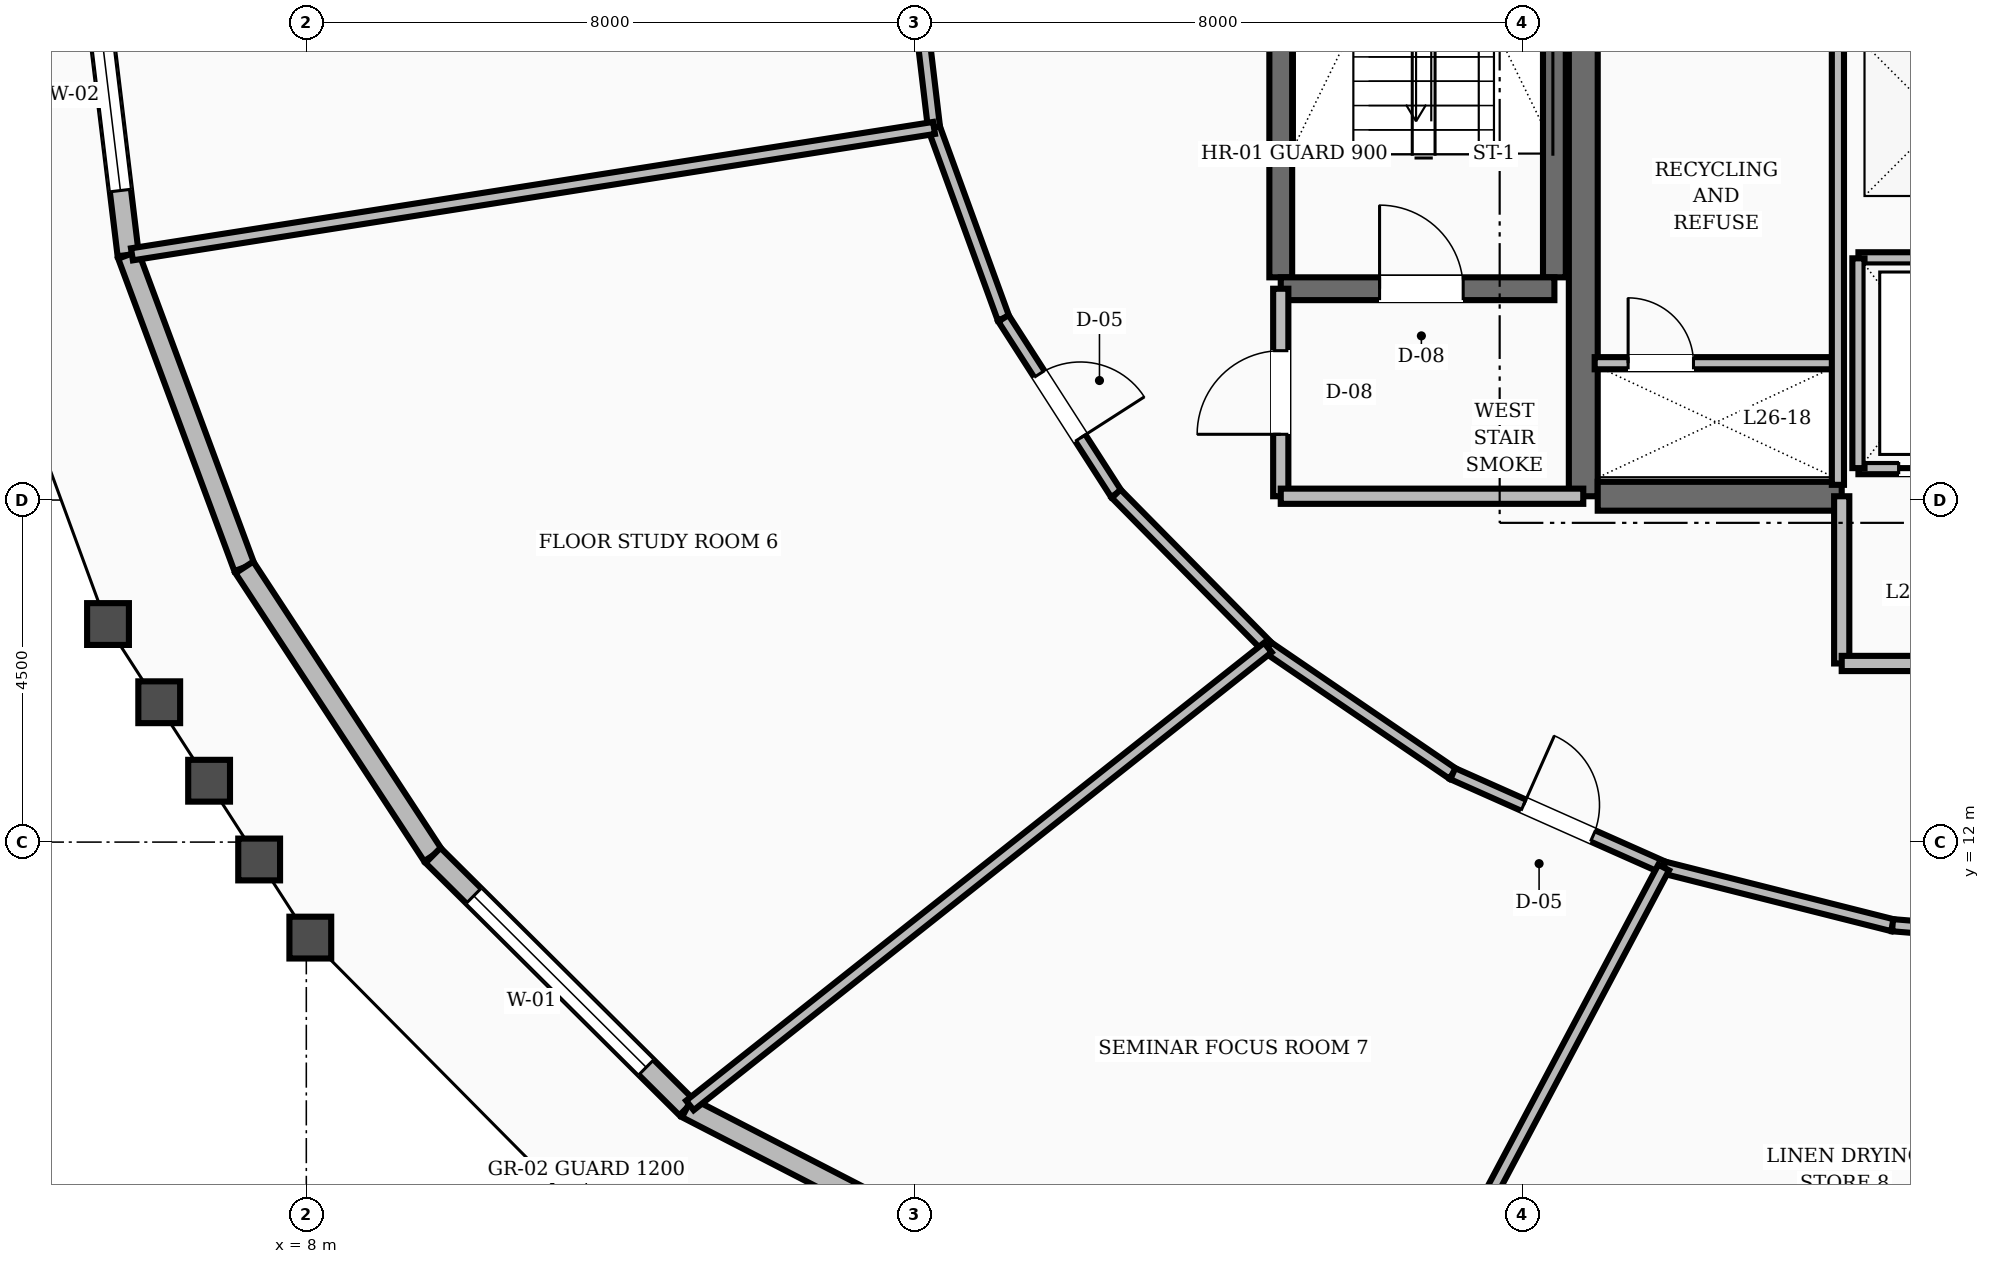
"""IFC4 building model, lengths in metres.
Left out: names, types, materials, properties, quantities, classifications, styles, units other than length and angle.
Written with IfcOpenShell. Run it as: python <this file> out.ifc"""

import sys

from ifc_helpers import new_model, si_unit, direction, frame, frame_2d, origin, place, context, subcontext, project, spatial, rectangle, extrude, element, fill, save


model = new_model("IFC4")
c1 = context("Model", 3, precision=1e-05, world=origin(), true_north=direction((0.0, 1.0)))
c2 = subcontext(c1, "Body", "Model", "MODEL_VIEW")
j1 = project(units=[si_unit("LENGTHUNIT", "METRE"), si_unit("PLANEANGLEUNIT", "RADIAN")], contexts=[c1])
p1 = place(None, origin())
s1 = spatial("IfcSite", under=j1, at=p1, CompositionType="ELEMENT")
p2 = place(p1, origin())
s2 = spatial("IfcBuilding", under=s1, at=p2, CompositionType="ELEMENT")
p3 = place(p2, frame((0.0, 0.0, 102.4)))
s3 = spatial("IfcBuildingStorey", under=s2, at=p3, CompositionType="ELEMENT", Elevation=102.4)
p4 = place(p3, frame((24.8, 16.55, 0.0), z_axis=(0.0, 0.0, 1.0), x_axis=(0.0, 1.0, 0.0)))
e1 = element("IfcWall", 1, at=p4, inside=s3, PredefinedType="SHEAR", context=c2, shape_type="SweptSolid", body=[
    extrude(rectangle(XDim=6.3, YDim=0.38, at=frame_2d((3.15, 0.0))), origin(), (0.0, 0.0, 1.0), 3.6),
])
p5 = place(p3, frame((24.99, 16.55, 0.0), z_axis=(0.0, 0.0, 1.0), x_axis=(1.0, 0.0, 0.0)))
e2 = element("IfcWall", 2, at=p5, inside=s3, PredefinedType="SHEAR", context=c2, shape_type="SweptSolid", body=[
    extrude(rectangle(XDim=3.21, YDim=0.38, at=frame_2d((1.605, 0.0))), origin(), (0.0, 0.0, 1.0), 3.6),
])
for number, where, z_axis, x_axis in (
    (3, (20.82, 19.43, 0.0), (0.0, 0.0, 1.0), (0.0, 1.0, 0.0)),
    (4, (24.42, 19.43, 0.0), (0.0, 0.0, 1.0), (0.0, 1.0, 0.0)),
):
    element("IfcWall", number, at=place(p3, frame(where, z_axis=z_axis, x_axis=x_axis)), inside=s3, PredefinedType="SHEAR", context=c2, shape_type="SweptSolid", body=[
        extrude(rectangle(XDim=8.74, YDim=0.3, at=frame_2d((4.37, 0.0))), origin(), (0.0, 0.0, 1.0), 3.6),
    ])
p6 = place(p3, frame((20.82, 19.28, 0.0), z_axis=(0.0, 0.0, 1.0), x_axis=(1.0, 0.0, 0.0)))
e5 = element("IfcWall", 5, at=p6, inside=s3, PredefinedType="SHEAR", context=c2, shape_type="SweptSolid", body=[
    extrude(rectangle(XDim=3.6, YDim=0.3, at=frame_2d((1.8, 0.0))), origin(), (0.0, 0.0, 1.0), 3.6),
])
p7 = place(p6, frame((1.3, 0.0, 0.0)))
e6 = element("IfcOpeningElement", 6, at=p7, cuts=e5, PredefinedType="OPENING", context=c2, shape_type="SweptSolid", body=[
    extrude(rectangle(XDim=1.1, YDim=2.1, at=frame_2d((0.55, 1.05))), frame((0.0, 0.16, 0.0), z_axis=(0.0, -1.0, 0.0), x_axis=(1.0, 0.0, 0.0)), (0.0, 0.0, 1.0), 0.32),
])
p8 = place(p3, frame((5.14, 24.0, 0.0), z_axis=(0.0, 0.0, 1.0), x_axis=(0.119853881621, -0.992791542601, 0.0)))
e7 = element("IfcWall", 7, at=p8, inside=s3, PredefinedType="STANDARD", context=c2, shape_type="SweptSolid", body=[
    extrude(rectangle(XDim=4.306, YDim=0.28, at=frame_2d((2.153, 0.0))), origin(), (0.0, 0.0, 1.0), 2.67),
])
p9 = place(p8, frame((0.853, 0.0, 0.8)))
e8 = element("IfcOpeningElement", 8, at=p9, cuts=e7, PredefinedType="OPENING", context=c2, shape_type="SweptSolid", body=[
    extrude(rectangle(XDim=2.6, YDim=1.65, at=frame_2d((1.3, 0.825))), frame((0.0, 0.15, 0.0), z_axis=(0.0, -1.0, 0.0), x_axis=(1.0, 0.0, 0.0)), (0.0, 0.0, 1.0), 0.3),
])
p10 = place(p3, frame((5.656, 19.725, 0.0), z_axis=(0.0, 0.0, 1.0), x_axis=(0.3485233369, -0.937300103295, 0.0)))
e9 = element("IfcWall", 9, at=p10, inside=s3, PredefinedType="STANDARD", context=c2, shape_type="SweptSolid", body=[
    extrude(rectangle(XDim=4.386, YDim=0.28, at=frame_2d((2.193, 0.0))), origin(), (0.0, 0.0, 1.0), 2.67),
])
p11 = place(p3, frame((7.185, 15.614, 0.0), z_axis=(0.0, 0.0, 1.0), x_axis=(0.547989842324, -0.836484986542, 0.0)))
e10 = element("IfcWall", 10, at=p11, inside=s3, PredefinedType="STANDARD", context=c2, shape_type="SweptSolid", body=[
    extrude(rectangle(XDim=4.529, YDim=0.28, at=frame_2d((2.265, 0.0))), origin(), (0.0, 0.0, 1.0), 2.67),
])
p12 = place(p3, frame((9.667, 11.825, 0.0), z_axis=(0.0, 0.0, 1.0), x_axis=(0.709177055594, -0.705030427583, 0.0)))
e11 = element("IfcWall", 11, at=p12, inside=s3, PredefinedType="STANDARD", context=c2, shape_type="SweptSolid", body=[
    extrude(rectangle(XDim=4.71, YDim=0.28, at=frame_2d((2.355, 0.0))), origin(), (0.0, 0.0, 1.0), 2.67),
])
p13 = place(p12, frame((0.755, 0.0, 0.8)))
e12 = element("IfcOpeningElement", 12, at=p13, cuts=e11, PredefinedType="OPENING", context=c2, shape_type="SweptSolid", body=[
    extrude(rectangle(XDim=3.2, YDim=1.65, at=frame_2d((1.6, 0.825))), frame((0.0, 0.15, 0.0), z_axis=(0.0, -1.0, 0.0), x_axis=(1.0, 0.0, 0.0)), (0.0, 0.0, 1.0), 0.3),
])
p14 = place(p3, frame((13.007, 8.505, 0.0), z_axis=(0.0, 0.0, 1.0), x_axis=(0.888766343183, -0.458360542833, 0.0)))
e13 = element("IfcWall", 13, at=p14, inside=s3, PredefinedType="STANDARD", context=c2, shape_type="SweptSolid", body=[
    extrude(rectangle(XDim=5.022, YDim=0.28, at=frame_2d((2.511, 0.0))), origin(), (0.0, 0.0, 1.0), 2.67),
])
p15 = place(p3, frame((20.82, 16.55, 0.0), z_axis=(0.0, 0.0, 1.0), x_axis=(0.0, 1.0, 0.0)))
e14 = element("IfcWall", 14, at=p15, inside=s3, PredefinedType="SOLIDWALL", context=c2, shape_type="SweptSolid", body=[
    extrude(rectangle(XDim=2.73, YDim=0.2, at=frame_2d((1.365, 0.0))), origin(), (0.0, 0.0, 1.0), 2.67),
])
p16 = place(p15, frame((0.815, 0.0, 0.0)))
e15 = element("IfcOpeningElement", 15, at=p16, cuts=e14, PredefinedType="OPENING", context=c2, shape_type="SweptSolid", body=[
    extrude(rectangle(XDim=1.1, YDim=2.1, at=frame_2d((0.55, 1.05))), frame((0.0, 0.11, 0.0), z_axis=(0.0, -1.0, 0.0), x_axis=(1.0, 0.0, 0.0)), (0.0, 0.0, 1.0), 0.22),
])
p17 = place(p3, frame((20.82, 16.55, 0.0), z_axis=(0.0, 0.0, 1.0), x_axis=(1.0, 0.0, 0.0)))
e16 = element("IfcWall", 16, at=p17, inside=s3, PredefinedType="SOLIDWALL", context=c2, shape_type="SweptSolid", body=[
    extrude(rectangle(XDim=3.98, YDim=0.2, at=frame_2d((1.99, 0.0))), origin(), (0.0, 0.0, 1.0), 2.67),
])
p18 = place(p3, frame((28.2, 14.35, 0.0), z_axis=(0.0, 0.0, 1.0), x_axis=(0.0, 1.0, 0.0)))
e17 = element("IfcWall", 17, at=p18, inside=s3, PredefinedType="SOLIDWALL", context=c2, shape_type="SweptSolid", body=[
    extrude(rectangle(XDim=2.2, YDim=0.2, at=frame_2d((1.1, 0.0))), origin(), (0.0, 0.0, 1.0), 2.67),
])
p19 = place(p3, frame((28.2, 14.35, 0.0), z_axis=(0.0, 0.0, 1.0), x_axis=(1.0, 0.0, 0.0)))
e18 = element("IfcWall", 18, at=p19, inside=s3, PredefinedType="SOLIDWALL", context=c2, shape_type="SweptSolid", body=[
    extrude(rectangle(XDim=7.6, YDim=0.2, at=frame_2d((3.8, 0.0))), origin(), (0.0, 0.0, 1.0), 2.67),
])
p20 = place(p19, frame((3.2, 0.0, 0.0)))
e19 = element("IfcOpeningElement", 19, at=p20, cuts=e18, PredefinedType="OPENING", context=c2, shape_type="SweptSolid", body=[
    extrude(rectangle(XDim=1.2, YDim=2.1, at=frame_2d((0.6, 1.05))), frame((0.0, 0.11, 0.0), z_axis=(0.0, -1.0, 0.0), x_axis=(1.0, 0.0, 0.0)), (0.0, 0.0, 1.0), 0.22),
])
p21 = place(p3, frame((28.42, 16.92, 0.0), z_axis=(0.0, 0.0, 1.0), x_axis=(1.0, 0.0, 0.0)))
e20 = element("IfcWall", 20, at=p21, inside=s3, PredefinedType="SOLIDWALL", context=c2, shape_type="SweptSolid", body=[
    extrude(rectangle(XDim=7.16, YDim=0.16, at=frame_2d((3.58, 0.0))), origin(), (0.0, 0.0, 1.0), 2.67),
])
p22 = place(p21, frame((0.53, 0.0, 0.0)))
e21 = element("IfcOpeningElement", 21, at=p22, cuts=e20, PredefinedType="OPENING", context=c2, shape_type="SweptSolid", body=[
    extrude(rectangle(XDim=1.1, YDim=2.15, at=frame_2d((0.55, 1.075))), frame((0.0, 0.09, 0.0), z_axis=(0.0, -1.0, 0.0), x_axis=(1.0, 0.0, 0.0)), (0.0, 0.0, 1.0), 0.18),
])
p23 = place(p21, frame((3.03, 0.0, 0.0)))
e22 = element("IfcOpeningElement", 22, at=p23, cuts=e20, PredefinedType="OPENING", context=c2, shape_type="SweptSolid", body=[
    extrude(rectangle(XDim=1.1, YDim=2.15, at=frame_2d((0.55, 1.075))), frame((0.0, 0.09, 0.0), z_axis=(0.0, -1.0, 0.0), x_axis=(1.0, 0.0, 0.0)), (0.0, 0.0, 1.0), 0.18),
])
p24 = place(p21, frame((5.53, 0.0, 0.0)))
e23 = element("IfcOpeningElement", 23, at=p24, cuts=e20, PredefinedType="OPENING", context=c2, shape_type="SweptSolid", body=[
    extrude(rectangle(XDim=1.1, YDim=2.15, at=frame_2d((0.55, 1.075))), frame((0.0, 0.09, 0.0), z_axis=(0.0, -1.0, 0.0), x_axis=(1.0, 0.0, 0.0)), (0.0, 0.0, 1.0), 0.18),
])
p25 = place(p3, frame((28.42, 19.68, 0.0), z_axis=(0.0, 0.0, 1.0), x_axis=(1.0, 0.0, 0.0)))
e24 = element("IfcWall", 24, at=p25, inside=s3, PredefinedType="SOLIDWALL", context=c2, shape_type="SweptSolid", body=[
    extrude(rectangle(XDim=7.16, YDim=0.16, at=frame_2d((3.58, 0.0))), origin(), (0.0, 0.0, 1.0), 2.67),
])
p26 = place(p3, frame((28.42, 16.92, 0.0), z_axis=(0.0, 0.0, 1.0), x_axis=(0.0, 1.0, 0.0)))
e25 = element("IfcWall", 25, at=p26, inside=s3, PredefinedType="SOLIDWALL", context=c2, shape_type="SweptSolid", body=[
    extrude(rectangle(XDim=2.76, YDim=0.16, at=frame_2d((1.38, 0.0))), origin(), (0.0, 0.0, 1.0), 2.67),
])
p27 = place(p3, frame((24.95, 18.3, 0.0), z_axis=(0.0, 0.0, 1.0), x_axis=(1.0, 0.0, 0.0)))
e26 = element("IfcWall", 26, at=p27, inside=s3, PredefinedType="SOLIDWALL", context=c2, shape_type="SweptSolid", body=[
    extrude(rectangle(XDim=3.2, YDim=0.16, at=frame_2d((1.6, 0.0))), origin(), (0.0, 0.0, 1.0), 2.67),
])
p28 = place(p27, frame((0.44, 0.0, 0.0)))
e27 = element("IfcOpeningElement", 27, at=p28, cuts=e26, PredefinedType="OPENING", context=c2, shape_type="SweptSolid", body=[
    extrude(rectangle(XDim=0.86, YDim=2.05, at=frame_2d((0.43, 1.025))), frame((0.0, 0.09, 0.0), z_axis=(0.0, -1.0, 0.0), x_axis=(1.0, 0.0, 0.0)), (0.0, 0.0, 1.0), 0.18),
])
p29 = place(p3, frame((28.15, 16.7, 0.0), z_axis=(0.0, 0.0, 1.0), x_axis=(0.0, 1.0, 0.0)))
e28 = element("IfcWall", 28, at=p29, inside=s3, PredefinedType="SOLIDWALL", context=c2, shape_type="SweptSolid", body=[
    extrude(rectangle(XDim=6.05, YDim=0.16, at=frame_2d((3.025, 0.0))), origin(), (0.0, 0.0, 1.0), 2.67),
])
p30 = place(p3, frame((15.95, 24.0, 0.0), z_axis=(0.0, 0.0, 1.0), x_axis=(0.117570353762, -0.993064555765, 0.0)))
e29 = element("IfcWall", 29, at=p30, inside=s3, PredefinedType="SOLIDWALL", context=c2, shape_type="SweptSolid", body=[
    extrude(rectangle(XDim=2.623, YDim=0.16, at=frame_2d((1.312, 0.0))), origin(), (0.0, 0.0, 1.0), 2.67),
])
p31 = place(p3, frame((16.258, 21.396, 0.0), z_axis=(0.0, 0.0, 1.0), x_axis=(0.342617982381, -0.939474809747, 0.0)))
e30 = element("IfcWall", 30, at=p31, inside=s3, PredefinedType="SOLIDWALL", context=c2, shape_type="SweptSolid", body=[
    extrude(rectangle(XDim=2.666, YDim=0.16, at=frame_2d((1.333, 0.0))), origin(), (0.0, 0.0, 1.0), 2.67),
])
p32 = place(p3, frame((17.172, 18.891, 0.0), z_axis=(0.0, 0.0, 1.0), x_axis=(0.540595670038, -0.841282545603, 0.0)))
e31 = element("IfcWall", 31, at=p32, inside=s3, PredefinedType="SOLIDWALL", context=c2, shape_type="SweptSolid", body=[
    extrude(rectangle(XDim=2.744, YDim=0.16, at=frame_2d((1.372, 0.0))), origin(), (0.0, 0.0, 1.0), 2.67),
])
p33 = place(p32, frame((0.872, 0.0, 0.0)))
e32 = element("IfcOpeningElement", 32, at=p33, cuts=e31, PredefinedType="OPENING", context=c2, shape_type="SweptSolid", body=[
    extrude(rectangle(XDim=1.0, YDim=2.1, at=frame_2d((0.5, 1.05))), frame((0.0, 0.09, 0.0), z_axis=(0.0, -1.0, 0.0), x_axis=(1.0, 0.0, 0.0)), (0.0, 0.0, 1.0), 0.18),
])
p34 = place(p3, frame((18.655, 16.583, 0.0), z_axis=(0.0, 0.0, 1.0), x_axis=(0.702366174226, -0.711815816981, 0.0)))
e33 = element("IfcWall", 33, at=p34, inside=s3, PredefinedType="SOLIDWALL", context=c2, shape_type="SweptSolid", body=[
    extrude(rectangle(XDim=2.842, YDim=0.16, at=frame_2d((1.421, 0.0))), origin(), (0.0, 0.0, 1.0), 2.67),
])
p35 = place(p3, frame((20.651, 14.56, 0.0), z_axis=(0.0, 0.0, 1.0), x_axis=(0.825929039072, -0.563774088104, 0.0)))
e34 = element("IfcWall", 34, at=p35, inside=s3, PredefinedType="SOLIDWALL", context=c2, shape_type="SweptSolid", body=[
    extrude(rectangle(XDim=2.945, YDim=0.16, at=frame_2d((1.472, 0.0))), origin(), (0.0, 0.0, 1.0), 2.67),
])
p36 = place(p3, frame((23.083, 12.9, 0.0), z_axis=(0.0, 0.0, 1.0), x_axis=(0.913768445178, -0.406235434936, 0.0)))
e35 = element("IfcWall", 35, at=p36, inside=s3, PredefinedType="SOLIDWALL", context=c2, shape_type="SweptSolid", body=[
    extrude(rectangle(XDim=3.037, YDim=0.16, at=frame_2d((1.519, 0.0))), origin(), (0.0, 0.0, 1.0), 2.67),
])
p37 = place(p36, frame((1.018, 0.0, 0.0)))
e36 = element("IfcOpeningElement", 36, at=p37, cuts=e35, PredefinedType="OPENING", context=c2, shape_type="SweptSolid", body=[
    extrude(rectangle(XDim=1.0, YDim=2.1, at=frame_2d((0.5, 1.05))), frame((0.0, 0.09, 0.0), z_axis=(0.0, -1.0, 0.0), x_axis=(1.0, 0.0, 0.0)), (0.0, 0.0, 1.0), 0.18),
])
p38 = place(p3, frame((25.858, 11.666, 0.0), z_axis=(0.0, 0.0, 1.0), x_axis=(0.969608333194, -0.244662380029, 0.0)))
e37 = element("IfcWall", 37, at=p38, inside=s3, PredefinedType="SOLIDWALL", context=c2, shape_type="SweptSolid", body=[
    extrude(rectangle(XDim=3.105, YDim=0.16, at=frame_2d((1.553, 0.0))), origin(), (0.0, 0.0, 1.0), 2.67),
])
p39 = place(p3, frame((28.869, 10.906, 0.0), z_axis=(0.0, 0.0, 1.0), x_axis=(0.996658973252, -0.081675522876, 0.0)))
e38 = element("IfcWall", 38, at=p39, inside=s3, PredefinedType="SOLIDWALL", context=c2, shape_type="SweptSolid", body=[
    extrude(rectangle(XDim=3.142, YDim=0.16, at=frame_2d((1.571, 0.0))), origin(), (0.0, 0.0, 1.0), 2.67),
])
p40 = place(p39, frame((1.096, 0.0, 0.0)))
e39 = element("IfcOpeningElement", 39, at=p40, cuts=e38, PredefinedType="OPENING", context=c2, shape_type="SweptSolid", body=[
    extrude(rectangle(XDim=0.95, YDim=2.1, at=frame_2d((0.475, 1.05))), frame((0.0, 0.09, 0.0), z_axis=(0.0, -1.0, 0.0), x_axis=(1.0, 0.0, 0.0)), (0.0, 0.0, 1.0), 0.18),
])
p41 = place(p3, frame((16.258, 21.396, 0.0), z_axis=(0.0, 0.0, 1.0), x_axis=(-0.987811096545, -0.155657436517, 0.0)))
e40 = element("IfcWall", 40, at=p41, inside=s3, PredefinedType="SOLIDWALL", context=c2, shape_type="SweptSolid", body=[
    extrude(rectangle(XDim=10.683, YDim=0.16, at=frame_2d((5.341, 0.0))), origin(), (0.0, 0.0, 1.0), 2.67),
])
p42 = place(p3, frame((20.651, 14.56, 0.0), z_axis=(0.0, 0.0, 1.0), x_axis=(-0.783825840098, -0.620980718215, 0.0)))
e41 = element("IfcWall", 41, at=p42, inside=s3, PredefinedType="SOLIDWALL", context=c2, shape_type="SweptSolid", body=[
    extrude(rectangle(XDim=9.701, YDim=0.16, at=frame_2d((4.851, 0.0))), origin(), (0.0, 0.0, 1.0), 2.67),
])
p43 = place(p3, frame((25.858, 11.666, 0.0), z_axis=(0.0, 0.0, 1.0), x_axis=(-0.468598051713, -0.883411492981, 0.0)))
e42 = element("IfcWall", 42, at=p43, inside=s3, PredefinedType="SOLIDWALL", context=c2, shape_type="SweptSolid", body=[
    extrude(rectangle(XDim=8.32, YDim=0.16, at=frame_2d((4.16, 0.0))), origin(), (0.0, 0.0, 1.0), 2.67),
])
p44 = place(p9, origin())
e43 = element("IfcWindow", 43, at=p44, inside=s3, PartitioningType="SINGLE_PANEL", PredefinedType="WINDOW", context=c2, shape_type="SweptSolid", body=[
    extrude(rectangle(XDim=2.6, YDim=1.65, at=frame_2d((1.3, 0.825))), frame((0.0, 0.03, 0.0), z_axis=(0.0, -1.0, 0.0), x_axis=(1.0, 0.0, 0.0)), (0.0, 0.0, 1.0), 0.06),
])
fill(e8, e43)
p45 = place(p13, origin())
e44 = element("IfcWindow", 44, at=p45, inside=s3, PartitioningType="SINGLE_PANEL", PredefinedType="WINDOW", context=c2, shape_type="SweptSolid", body=[
    extrude(rectangle(XDim=3.2, YDim=1.65, at=frame_2d((1.6, 0.825))), frame((0.0, 0.03, 0.0), z_axis=(0.0, -1.0, 0.0), x_axis=(1.0, 0.0, 0.0)), (0.0, 0.0, 1.0), 0.06),
])
fill(e12, e44)
p46 = place(p7, origin())
e45 = element("IfcDoor", 45, at=p46, inside=s3, OperationType="SINGLE_SWING_LEFT", PredefinedType="DOOR", context=c2, shape_type="SweptSolid", body=[
    extrude(rectangle(XDim=1.1, YDim=2.1, at=frame_2d((0.55, 1.05))), frame((0.0, 0.025, 0.0), z_axis=(0.0, -1.0, 0.0), x_axis=(1.0, 0.0, 0.0)), (0.0, 0.0, 1.0), 0.05),
])
fill(e6, e45)
p47 = place(p16, origin())
e46 = element("IfcDoor", 46, at=p47, inside=s3, OperationType="SINGLE_SWING_LEFT", PredefinedType="DOOR", context=c2, shape_type="SweptSolid", body=[
    extrude(rectangle(XDim=1.1, YDim=2.1, at=frame_2d((0.55, 1.05))), frame((0.0, 0.025, 0.0), z_axis=(0.0, -1.0, 0.0), x_axis=(1.0, 0.0, 0.0)), (0.0, 0.0, 1.0), 0.05),
])
fill(e15, e46)
p48 = place(p22, origin())
e47 = element("IfcDoor", 47, at=p48, inside=s3, OperationType="SLIDING_TO_RIGHT", PredefinedType="DOOR", context=c2, shape_type="SweptSolid", body=[
    extrude(rectangle(XDim=1.1, YDim=2.15, at=frame_2d((0.55, 1.075))), frame((0.0, 0.025, 0.0), z_axis=(0.0, -1.0, 0.0), x_axis=(1.0, 0.0, 0.0)), (0.0, 0.0, 1.0), 0.05),
])
fill(e21, e47)
p49 = place(p28, origin())
e48 = element("IfcDoor", 48, at=p49, inside=s3, OperationType="SINGLE_SWING_LEFT", PredefinedType="TRAPDOOR", context=c2, shape_type="SweptSolid", body=[
    extrude(rectangle(XDim=0.86, YDim=2.05, at=frame_2d((0.43, 1.025))), frame((0.0, 0.025, 0.0), z_axis=(0.0, -1.0, 0.0), x_axis=(1.0, 0.0, 0.0)), (0.0, 0.0, 1.0), 0.05),
])
fill(e27, e48)
p50 = place(p33, origin())
e49 = element("IfcDoor", 49, at=p50, inside=s3, OperationType="SINGLE_SWING_RIGHT", PredefinedType="DOOR", context=c2, shape_type="SweptSolid", body=[
    extrude(rectangle(XDim=1.0, YDim=2.1, at=frame_2d((0.5, 1.05))), frame((0.0, 0.025, 0.0), z_axis=(0.0, -1.0, 0.0), x_axis=(1.0, 0.0, 0.0)), (0.0, 0.0, 1.0), 0.05),
])
fill(e32, e49)
p51 = place(p37, origin())
e50 = element("IfcDoor", 50, at=p51, inside=s3, OperationType="SINGLE_SWING_LEFT", PredefinedType="DOOR", context=c2, shape_type="SweptSolid", body=[
    extrude(rectangle(XDim=1.0, YDim=2.1, at=frame_2d((0.5, 1.05))), frame((0.0, 0.025, 0.0), z_axis=(0.0, -1.0, 0.0), x_axis=(1.0, 0.0, 0.0)), (0.0, 0.0, 1.0), 0.05),
])
fill(e36, e50)
save(model, sys.argv[1])
